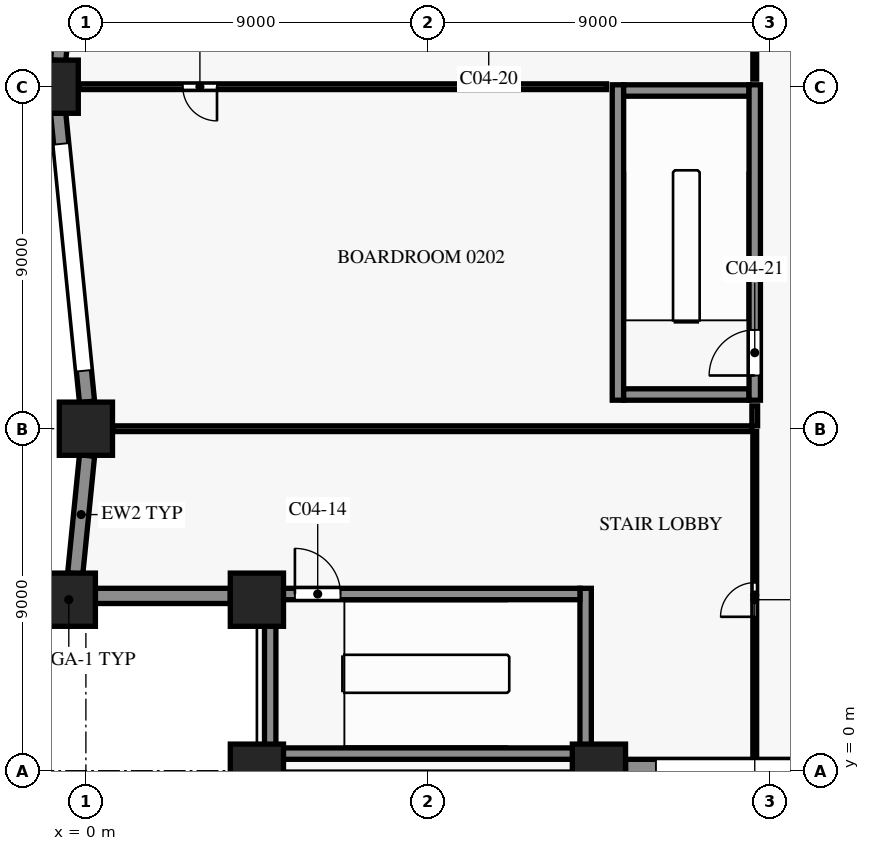
"""IFC4 building model, lengths in metres.
Left out: names, types, materials, properties, quantities, classifications, styles, units other than length and angle.
Written with IfcOpenShell. Run it as: python <this file> out.ifc"""

import sys

from ifc_helpers import new_model, si_unit, direction, frame, frame_2d, origin, origin_2d, place, context, subcontext, project, spatial, rectangle, extrude, element, fill, save


model = new_model("IFC4")
c1 = context("Model", 3, precision=1e-05, world=origin(), true_north=direction((0.0, 1.0)))
c2 = subcontext(c1, "Body", "Model", "MODEL_VIEW")
j1 = project(units=[si_unit("LENGTHUNIT", "METRE"), si_unit("PLANEANGLEUNIT", "RADIAN")], contexts=[c1])
p1 = place(None, origin())
s1 = spatial("IfcSite", under=j1, at=p1, CompositionType="ELEMENT")
p2 = place(p1, origin())
s2 = spatial("IfcBuilding", under=s1, at=p2, CompositionType="ELEMENT")
p3 = place(p2, frame((0.0, 0.0, 14.5)))
s3 = spatial("IfcBuildingStorey", under=s2, at=p3, CompositionType="ELEMENT", Elevation=14.5)
for number, where, z_axis, x_axis in (
    (1, (4.5, 0.0, 0.0), (0.0, 0.0, 1.0), (1.0, 0.0, 0.0)),
    (2, (13.5, 0.0, 0.0), (0.0, 0.0, 1.0), (1.0, 0.0, 0.0)),
    (3, (-0.9, 18.0, 0.0), (0.0, 0.0, 1.0), (1.0, 0.0, 0.0)),
    (4, (0.0, 9.0, 0.0), (0.0, 0.0, 1.0), (1.0, 0.0, 0.0)),
    (5, (-0.45, 4.5, 0.0), (0.0, 0.0, 1.0), (1.0, 0.0, 0.0)),
    (6, (4.5, 4.5, 0.0), (0.0, 0.0, 1.0), (1.0, 0.0, 0.0)),
):
    element("IfcColumn", number, at=place(p3, frame(where, z_axis=z_axis, x_axis=x_axis)), inside=s3, PredefinedType="COLUMN", context=c2, shape_type="SweptSolid", body=[
        extrude(rectangle(XDim=1.4, YDim=1.4, at=origin_2d()), origin(), (0.0, 0.0, 1.0), 5.0),
    ])
p4 = place(p3, frame((21.8, 0.1, 0.0), z_axis=(0.0, 0.0, 1.0), x_axis=(-1.0, 0.0, 0.0)))
e7 = element("IfcWall", 7, at=p4, inside=s3, PredefinedType="SOLIDWALL", context=c2, shape_type="SweptSolid", body=[
    extrude(rectangle(XDim=7.6, YDim=0.4, at=frame_2d((3.8, 0.0))), origin(), (0.0, 0.0, 1.0), 4.1),
])
p5 = place(p4, frame((0.8, 0.0, 0.9)))
e8 = element("IfcOpeningElement", 8, at=p5, cuts=e7, PredefinedType="OPENING", context=c2, shape_type="SweptSolid", body=[
    extrude(rectangle(XDim=6.0, YDim=1.8, at=frame_2d((3.0, 0.9))), frame((0.0, 0.21, 0.0), z_axis=(0.0, -1.0, 0.0), x_axis=(1.0, 0.0, 0.0)), (0.0, 0.0, 1.0), 0.42),
])
p6 = place(p3, frame((-0.731, 18.687, 0.0), z_axis=(0.0, 0.0, 1.0), x_axis=(0.099478423711, 0.995039719416, 0.0)))
e9 = element("IfcWall", 9, at=p6, inside=s3, PredefinedType="SOLIDWALL", context=c2, shape_type="SweptSolid", body=[
    extrude(rectangle(XDim=7.645, YDim=0.4, at=frame_2d((3.822, 0.0))), origin(), (0.0, 0.0, 1.0), 4.1),
])
p7 = place(p6, frame((0.823, 0.0, 0.9)))
e10 = element("IfcOpeningElement", 10, at=p7, cuts=e9, PredefinedType="OPENING", context=c2, shape_type="SweptSolid", body=[
    extrude(rectangle(XDim=6.0, YDim=1.8, at=frame_2d((3.0, 0.9))), frame((0.0, 0.21, 0.0), z_axis=(0.0, -1.0, 0.0), x_axis=(1.0, 0.0, 0.0)), (0.0, 0.0, 1.0), 0.42),
])
p8 = place(p3, frame((0.03, 9.707, 0.0), z_axis=(0.0, 0.0, 1.0), x_axis=(-0.099478423711, 0.995039719416, 0.0)))
e11 = element("IfcWall", 11, at=p8, inside=s3, PredefinedType="SOLIDWALL", context=c2, shape_type="SweptSolid", body=[
    extrude(rectangle(XDim=7.645, YDim=0.4, at=frame_2d((3.822, 0.0))), origin(), (0.0, 0.0, 1.0), 4.1),
])
p9 = place(p8, frame((0.823, 0.0, 0.9)))
e12 = element("IfcOpeningElement", 12, at=p9, cuts=e11, PredefinedType="OPENING", context=c2, shape_type="SweptSolid", body=[
    extrude(rectangle(XDim=6.0, YDim=1.8, at=frame_2d((3.0, 0.9))), frame((0.0, 0.21, 0.0), z_axis=(0.0, -1.0, 0.0), x_axis=(1.0, 0.0, 0.0)), (0.0, 0.0, 1.0), 0.42),
])
p10 = place(p3, frame((-0.281, 5.187, 0.0), z_axis=(0.0, 0.0, 1.0), x_axis=(0.099457269599, 0.995041834057, 0.0)))
e13 = element("IfcWall", 13, at=p10, inside=s3, PredefinedType="SOLIDWALL", context=c2, shape_type="SweptSolid", body=[
    extrude(rectangle(XDim=3.122, YDim=0.4, at=frame_2d((1.561, 0.0))), origin(), (0.0, 0.0, 1.0), 4.1),
])
p11 = place(p3, frame((3.8, 4.6, 0.0), z_axis=(0.0, 0.0, 1.0), x_axis=(-1.0, 0.0, 0.0)))
e14 = element("IfcWall", 14, at=p11, inside=s3, PredefinedType="SOLIDWALL", context=c2, shape_type="SweptSolid", body=[
    extrude(rectangle(XDim=3.55, YDim=0.4, at=frame_2d((1.775, 0.0))), origin(), (0.0, 0.0, 1.0), 4.1),
])
p12 = place(p3, frame((5.0, 0.45, 0.0), z_axis=(0.0, 0.0, 1.0), x_axis=(1.0, 0.0, 0.0)))
e15 = element("IfcWall", 15, at=p12, inside=s3, PredefinedType="SHEAR", context=c2, shape_type="SweptSolid", body=[
    extrude(rectangle(XDim=8.0, YDim=0.3, at=frame_2d((4.0, 0.0))), origin(), (0.0, 0.0, 1.0), 4.7),
])
p13 = place(p3, frame((5.0, 4.65, 0.0), z_axis=(0.0, 0.0, 1.0), x_axis=(1.0, 0.0, 0.0)))
e16 = element("IfcWall", 16, at=p13, inside=s3, PredefinedType="SHEAR", context=c2, shape_type="SweptSolid", body=[
    extrude(rectangle(XDim=8.0, YDim=0.3, at=frame_2d((4.0, 0.0))), origin(), (0.0, 0.0, 1.0), 4.7),
])
p14 = place(p13, frame((0.5, 0.0, 0.0)))
e17 = element("IfcOpeningElement", 17, at=p14, cuts=e16, PredefinedType="OPENING", context=c2, shape_type="SweptSolid", body=[
    extrude(rectangle(XDim=1.2, YDim=2.2, at=frame_2d((0.6, 1.1))), frame((0.0, 0.16, 0.0), z_axis=(0.0, -1.0, 0.0), x_axis=(1.0, 0.0, 0.0)), (0.0, 0.0, 1.0), 0.32),
])
for number, where, z_axis, x_axis in (
    (18, (14.15, 9.9, 0.0), (0.0, 0.0, 1.0), (1.0, 0.0, 0.0)),
    (19, (14.15, 17.9, 0.0), (0.0, 0.0, 1.0), (1.0, 0.0, 0.0)),
):
    element("IfcWall", number, at=place(p3, frame(where, z_axis=z_axis, x_axis=x_axis)), inside=s3, PredefinedType="SHEAR", context=c2, shape_type="SweptSolid", body=[
        extrude(rectangle(XDim=3.3, YDim=0.3, at=frame_2d((1.65, 0.0))), origin(), (0.0, 0.0, 1.0), 4.7),
    ])
for number, where, z_axis, x_axis in (
    (20, (4.85, 0.3, 0.0), (0.0, 0.0, 1.0), (0.0, 1.0, 0.0)),
    (21, (13.15, 0.3, 0.0), (0.0, 0.0, 1.0), (0.0, 1.0, 0.0)),
):
    element("IfcWall", number, at=place(p3, frame(where, z_axis=z_axis, x_axis=x_axis)), inside=s3, PredefinedType="SHEAR", context=c2, shape_type="SweptSolid", body=[
        extrude(rectangle(XDim=4.5, YDim=0.3, at=frame_2d((2.25, 0.0))), origin(), (0.0, 0.0, 1.0), 4.7),
    ])
p15 = place(p3, frame((14.0, 9.75, 0.0), z_axis=(0.0, 0.0, 1.0), x_axis=(0.0, 1.0, 0.0)))
e22 = element("IfcWall", 22, at=p15, inside=s3, PredefinedType="SHEAR", context=c2, shape_type="SweptSolid", body=[
    extrude(rectangle(XDim=8.3, YDim=0.3, at=frame_2d((4.15, 0.0))), origin(), (0.0, 0.0, 1.0), 4.7),
])
p16 = place(p3, frame((17.6, 9.75, 0.0), z_axis=(0.0, 0.0, 1.0), x_axis=(0.0, 1.0, 0.0)))
e23 = element("IfcWall", 23, at=p16, inside=s3, PredefinedType="SHEAR", context=c2, shape_type="SweptSolid", body=[
    extrude(rectangle(XDim=8.3, YDim=0.3, at=frame_2d((4.15, 0.0))), origin(), (0.0, 0.0, 1.0), 4.7),
])
p17 = place(p16, frame((0.65, 0.0, 0.0)))
e24 = element("IfcOpeningElement", 24, at=p17, cuts=e23, PredefinedType="OPENING", context=c2, shape_type="SweptSolid", body=[
    extrude(rectangle(XDim=1.2, YDim=2.2, at=frame_2d((0.6, 1.1))), frame((0.0, 0.16, 0.0), z_axis=(0.0, -1.0, 0.0), x_axis=(1.0, 0.0, 0.0)), (0.0, 0.0, 1.0), 0.32),
])
p18 = place(p3, frame((17.6, 0.32, 0.0), z_axis=(0.0, 0.0, 1.0), x_axis=(0.0, 1.0, 0.0)))
e25 = element("IfcWall", 25, at=p18, inside=s3, PredefinedType="PARTITIONING", context=c2, shape_type="SweptSolid", body=[
    extrude(rectangle(XDim=8.605, YDim=0.1, at=frame_2d((4.302, 0.0))), origin(), (0.0, 0.0, 1.0), 3.98),
])
p19 = place(p18, frame((3.73, 0.0, 0.0)))
e26 = element("IfcOpeningElement", 26, at=p19, cuts=e25, PredefinedType="OPENING", context=c2, shape_type="SweptSolid", body=[
    extrude(rectangle(XDim=0.9, YDim=2.1, at=frame_2d((0.45, 1.05))), frame((0.0, 0.06, 0.0), z_axis=(0.0, -1.0, 0.0), x_axis=(1.0, 0.0, 0.0)), (0.0, 0.0, 1.0), 0.12),
])
p20 = place(p3, frame((0.72, 9.0, 0.0), z_axis=(0.0, 0.0, 1.0), x_axis=(1.0, 0.0, 0.0)))
e27 = element("IfcWall", 27, at=p20, inside=s3, PredefinedType="PARTITIONING", context=c2, shape_type="SweptSolid", body=[
    extrude(rectangle(XDim=16.805, YDim=0.15, at=frame_2d((8.402, 0.0))), origin(), (0.0, 0.0, 1.0), 3.98),
])
p21 = place(p3, frame((17.6, 9.075, 0.0), z_axis=(0.0, 0.0, 1.0), x_axis=(0.0, 1.0, 0.0)))
e28 = element("IfcWall", 28, at=p21, inside=s3, PredefinedType="PARTITIONING", context=c2, shape_type="SweptSolid", body=[
    extrude(rectangle(XDim=0.525, YDim=0.15, at=frame_2d((0.263, 0.0))), origin(), (0.0, 0.0, 1.0), 3.98),
])
p22 = place(p3, frame((13.7, 18.0, 0.0), z_axis=(0.0, 0.0, 1.0), x_axis=(-1.0, 0.0, 0.0)))
e29 = element("IfcWall", 29, at=p22, inside=s3, PredefinedType="PARTITIONING", context=c2, shape_type="SweptSolid", body=[
    extrude(rectangle(XDim=13.88, YDim=0.15, at=frame_2d((6.94, 0.0))), origin(), (0.0, 0.0, 1.0), 3.98),
])
p23 = place(p22, frame((10.25, 0.0, 0.0)))
e30 = element("IfcOpeningElement", 30, at=p23, cuts=e29, PredefinedType="OPENING", context=c2, shape_type="SweptSolid", body=[
    extrude(rectangle(XDim=0.9, YDim=2.1, at=frame_2d((0.45, 1.05))), frame((0.0, 0.085, 0.0), z_axis=(0.0, -1.0, 0.0), x_axis=(1.0, 0.0, 0.0)), (0.0, 0.0, 1.0), 0.17),
])
p24 = place(p3, frame((17.6, 18.2, 0.0), z_axis=(0.0, 0.0, 1.0), x_axis=(0.0, 1.0, 0.0)))
e31 = element("IfcWall", 31, at=p24, inside=s3, PredefinedType="PARTITIONING", context=c2, shape_type="SweptSolid", body=[
    extrude(rectangle(XDim=8.75, YDim=0.1, at=frame_2d((4.375, 0.0))), origin(), (0.0, 0.0, 1.0), 3.98),
])
p25 = place(p24, frame((3.35, 0.0, 0.0)))
e32 = element("IfcOpeningElement", 32, at=p25, cuts=e31, PredefinedType="OPENING", context=c2, shape_type="SweptSolid", body=[
    extrude(rectangle(XDim=0.9, YDim=2.1, at=frame_2d((0.45, 1.05))), frame((0.0, 0.06, 0.0), z_axis=(0.0, -1.0, 0.0), x_axis=(1.0, 0.0, 0.0)), (0.0, 0.0, 1.0), 0.12),
])
p26 = place(p5, origin())
e33 = element("IfcWindow", 33, at=p26, inside=s3, PartitioningType="SINGLE_PANEL", PredefinedType="WINDOW", context=c2, shape_type="SweptSolid", body=[
    extrude(rectangle(XDim=6.0, YDim=1.8, at=frame_2d((3.0, 0.9))), frame((0.0, 0.03, 0.0), z_axis=(0.0, -1.0, 0.0), x_axis=(1.0, 0.0, 0.0)), (0.0, 0.0, 1.0), 0.06),
])
fill(e8, e33)
p27 = place(p9, origin())
e34 = element("IfcWindow", 34, at=p27, inside=s3, PartitioningType="SINGLE_PANEL", PredefinedType="WINDOW", context=c2, shape_type="SweptSolid", body=[
    extrude(rectangle(XDim=6.0, YDim=1.8, at=frame_2d((3.0, 0.9))), frame((0.0, 0.03, 0.0), z_axis=(0.0, -1.0, 0.0), x_axis=(1.0, 0.0, 0.0)), (0.0, 0.0, 1.0), 0.06),
])
fill(e12, e34)
p28 = place(p14, origin())
e35 = element("IfcDoor", 35, at=p28, inside=s3, OperationType="SINGLE_SWING_LEFT", PredefinedType="DOOR", context=c2, shape_type="SweptSolid", body=[
    extrude(rectangle(XDim=1.2, YDim=2.2, at=frame_2d((0.6, 1.1))), frame((0.0, 0.025, 0.0), z_axis=(0.0, -1.0, 0.0), x_axis=(1.0, 0.0, 0.0)), (0.0, 0.0, 1.0), 0.05),
])
fill(e17, e35)
p29 = place(p17, origin())
e36 = element("IfcDoor", 36, at=p29, inside=s3, OperationType="SINGLE_SWING_LEFT", PredefinedType="DOOR", context=c2, shape_type="SweptSolid", body=[
    extrude(rectangle(XDim=1.2, YDim=2.2, at=frame_2d((0.6, 1.1))), frame((0.0, 0.025, 0.0), z_axis=(0.0, -1.0, 0.0), x_axis=(1.0, 0.0, 0.0)), (0.0, 0.0, 1.0), 0.05),
])
fill(e24, e36)
p30 = place(p19, origin())
e37 = element("IfcDoor", 37, at=p30, inside=s3, OperationType="SINGLE_SWING_LEFT", PredefinedType="DOOR", context=c2, shape_type="SweptSolid", body=[
    extrude(rectangle(XDim=0.9, YDim=2.1, at=frame_2d((0.45, 1.05))), frame((0.0, 0.025, 0.0), z_axis=(0.0, -1.0, 0.0), x_axis=(1.0, 0.0, 0.0)), (0.0, 0.0, 1.0), 0.05),
])
fill(e26, e37)
p31 = place(p23, origin())
e38 = element("IfcDoor", 38, at=p31, inside=s3, OperationType="SINGLE_SWING_RIGHT", PredefinedType="DOOR", context=c2, shape_type="SweptSolid", body=[
    extrude(rectangle(XDim=0.9, YDim=2.1, at=frame_2d((0.45, 1.05))), frame((0.0, 0.025, 0.0), z_axis=(0.0, -1.0, 0.0), x_axis=(1.0, 0.0, 0.0)), (0.0, 0.0, 1.0), 0.05),
])
fill(e30, e38)
save(model, sys.argv[1])
